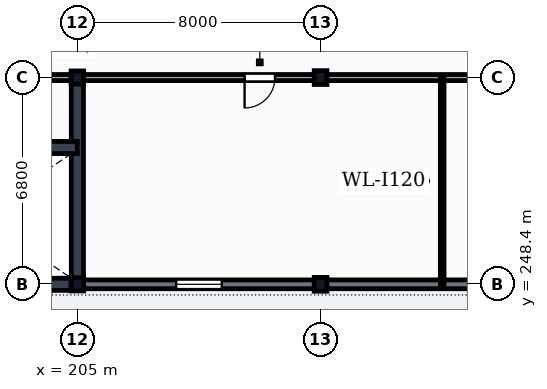
"""IFC4 building model, lengths in metres.
Left out: names, types, materials, properties, quantities, classifications, styles, units other than length and angle.
Written with IfcOpenShell. Run it as: python <this file> out.ifc"""

import sys

from ifc_helpers import new_model, si_unit, direction, frame, frame_2d, origin, origin_2d, place, context, subcontext, project, spatial, rectangle, i_section, extrude, element, fill, save


model = new_model("IFC4")
c1 = context("Model", 3, precision=1e-05, world=origin(), true_north=direction((0.0, 1.0)))
c2 = subcontext(c1, "Body", "Model", "MODEL_VIEW")
j1 = project(units=[si_unit("LENGTHUNIT", "METRE"), si_unit("PLANEANGLEUNIT", "RADIAN")], contexts=[c1])
p1 = place(None, origin())
s1 = spatial("IfcSite", under=j1, at=p1, CompositionType="ELEMENT")
p2 = place(p1, origin())
s2 = spatial("IfcBuilding", under=s1, at=p2, CompositionType="ELEMENT")
p3 = place(p2, frame((0.0, 0.0, 5.4)))
s3 = spatial("IfcBuildingStorey", under=s2, at=p3, CompositionType="ELEMENT", Elevation=5.4)
for number, where, z_axis, x_axis in (
    (1, (205.0, 248.4, 0.0), (0.0, 0.0, 1.0), (1.0, 0.0, 0.0)),
    (2, (205.0, 255.2, 0.0), (0.0, 0.0, 1.0), (1.0, 0.0, 0.0)),
):
    element("IfcColumn", number, at=place(p3, frame(where, z_axis=z_axis, x_axis=x_axis)), inside=s3, PredefinedType="COLUMN", context=c2, shape_type="SweptSolid", body=[
        extrude(i_section(OverallWidth=0.412, OverallDepth=0.435, WebThickness=0.036, FlangeThickness=0.057, FilletRadius=0.015, at=origin_2d()), origin(), (0.0, 0.0, 1.0), 5.1),
    ])
for number, where, z_axis, x_axis in (
    (3, (213.0, 248.4, 0.0), (0.0, 0.0, 1.0), (1.0, 0.0, 0.0)),
    (4, (213.0, 255.2, 0.0), (0.0, 0.0, 1.0), (1.0, 0.0, 0.0)),
):
    element("IfcColumn", number, at=place(p3, frame(where, z_axis=z_axis, x_axis=x_axis)), inside=s3, PredefinedType="COLUMN", context=c2, shape_type="SweptSolid", body=[
        extrude(i_section(OverallWidth=0.418, OverallDepth=0.455, WebThickness=0.042, FlangeThickness=0.068, FilletRadius=0.015, at=origin_2d()), origin(), (0.0, 0.0, 1.0), 5.1),
    ])
p4 = place(p3, frame((205.006, 248.4, 0.0), z_axis=(0.0, 0.0, 1.0), x_axis=(1.0, 0.0, 0.0)))
e5 = element("IfcWall", 5, at=p4, inside=s3, PredefinedType="SOLIDWALL", context=c2, shape_type="SweptSolid", body=[
    extrude(rectangle(XDim=7.988, YDim=0.29, at=frame_2d((3.994, 0.0))), origin(), (0.0, 0.0, 1.0), 4.548),
])
p5 = place(p4, frame((3.244, 0.0, 0.95)))
e6 = element("IfcOpeningElement", 6, at=p5, cuts=e5, PredefinedType="OPENING", context=c2, shape_type="SweptSolid", body=[
    extrude(rectangle(XDim=1.5, YDim=1.9, at=frame_2d((0.75, 0.95))), frame((0.0, 0.16, 0.0), z_axis=(0.0, -1.0, 0.0), x_axis=(1.0, 0.0, 0.0)), (0.0, 0.0, 1.0), 0.32),
])
p6 = place(p3, frame((213.006, 248.4, 0.0), z_axis=(0.0, 0.0, 1.0), x_axis=(1.0, 0.0, 0.0)))
e7 = element("IfcWall", 7, at=p6, inside=s3, PredefinedType="SOLIDWALL", context=c2, shape_type="SweptSolid", body=[
    extrude(rectangle(XDim=7.988, YDim=0.29, at=frame_2d((3.994, 0.0))), origin(), (0.0, 0.0, 1.0), 4.548),
])
p7 = place(p6, frame((5.091, 0.0, 0.95)))
e8 = element("IfcOpeningElement", 8, at=p7, cuts=e7, PredefinedType="OPENING", context=c2, shape_type="SweptSolid", body=[
    extrude(rectangle(XDim=1.35, YDim=1.8, at=frame_2d((0.675, 0.9))), frame((0.0, 0.16, 0.0), z_axis=(0.0, -1.0, 0.0), x_axis=(1.0, 0.0, 0.0)), (0.0, 0.0, 1.0), 0.32),
])
p8 = place(p3, frame((197.0, 248.4, 0.0), z_axis=(0.0, 0.0, 1.0), x_axis=(1.0, 0.0, 0.0)))
e9 = element("IfcWall", 9, at=p8, inside=s3, PredefinedType="SHEAR", context=c2, shape_type="SweptSolid", body=[
    extrude(rectangle(XDim=8.0, YDim=0.4, at=frame_2d((4.0, 0.0))), origin(), (0.0, 0.0, 1.0), 4.86),
])
p9 = place(p3, frame((205.0, 248.4, 0.0), z_axis=(0.0, 0.0, 1.0), x_axis=(0.0, 1.0, 0.0)))
e10 = element("IfcWall", 10, at=p9, inside=s3, PredefinedType="SHEAR", context=c2, shape_type="SweptSolid", body=[
    extrude(rectangle(XDim=6.8, YDim=0.4, at=frame_2d((3.4, 0.0))), origin(), (0.0, 0.0, 1.0), 4.86),
])
p10 = place(p3, frame((197.0, 252.9, 0.0), z_axis=(0.0, 0.0, 1.0), x_axis=(1.0, 0.0, 0.0)))
e11 = element("IfcWall", 11, at=p10, inside=s3, PredefinedType="SHEAR", context=c2, shape_type="SweptSolid", body=[
    extrude(rectangle(XDim=8.0, YDim=0.4, at=frame_2d((4.0, 0.0))), origin(), (0.0, 0.0, 1.0), 4.86),
])
p11 = place(p10, frame((0.3, 0.0, 0.0)))
e12 = element("IfcOpeningElement", 12, at=p11, cuts=e11, PredefinedType="OPENING", context=c2, shape_type="SweptSolid", body=[
    extrude(rectangle(XDim=1.15, YDim=2.15, at=frame_2d((0.575, 1.075))), frame((0.0, 0.215, 0.0), z_axis=(0.0, -1.0, 0.0), x_axis=(1.0, 0.0, 0.0)), (0.0, 0.0, 1.0), 0.43),
])
p12 = place(p3, frame((197.0, 255.2, 0.0), z_axis=(0.0, 0.0, 1.0), x_axis=(1.0, 0.0, 0.0)))
e13 = element("IfcWall", 13, at=p12, inside=s3, PredefinedType="PARTITIONING", context=c2, shape_type="SweptSolid", body=[
    extrude(rectangle(XDim=8.0, YDim=0.2, at=frame_2d((4.0, 0.0))), origin(), (0.0, 0.0, 1.0), 4.358),
])
p13 = place(p12, frame((3.275, 0.0, 0.0)))
e14 = element("IfcOpeningElement", 14, at=p13, cuts=e13, PredefinedType="OPENING", context=c2, shape_type="SweptSolid", body=[
    extrude(rectangle(XDim=1.45, YDim=2.2, at=frame_2d((0.725, 1.1))), frame((0.0, 0.115, 0.0), z_axis=(0.0, -1.0, 0.0), x_axis=(1.0, 0.0, 0.0)), (0.0, 0.0, 1.0), 0.23),
])
p14 = place(p3, frame((205.0, 255.2, 0.0), z_axis=(0.0, 0.0, 1.0), x_axis=(1.0, 0.0, 0.0)))
e15 = element("IfcWall", 15, at=p14, inside=s3, PredefinedType="PARTITIONING", context=c2, shape_type="SweptSolid", body=[
    extrude(rectangle(XDim=24.0, YDim=0.2, at=frame_2d((12.0, 0.0))), origin(), (0.0, 0.0, 1.0), 4.358),
])
p15 = place(p14, frame((5.5, 0.0, 0.0)))
e16 = element("IfcOpeningElement", 16, at=p15, cuts=e15, PredefinedType="OPENING", context=c2, shape_type="SweptSolid", body=[
    extrude(rectangle(XDim=1.0, YDim=2.1, at=frame_2d((0.5, 1.05))), frame((0.0, 0.115, 0.0), z_axis=(0.0, -1.0, 0.0), x_axis=(1.0, 0.0, 0.0)), (0.0, 0.0, 1.0), 0.23),
])
p16 = place(p14, frame((17.5, 0.0, 0.0)))
e17 = element("IfcOpeningElement", 17, at=p16, cuts=e15, PredefinedType="OPENING", context=c2, shape_type="SweptSolid", body=[
    extrude(rectangle(XDim=1.0, YDim=2.1, at=frame_2d((0.5, 1.05))), frame((0.0, 0.115, 0.0), z_axis=(0.0, -1.0, 0.0), x_axis=(1.0, 0.0, 0.0)), (0.0, 0.0, 1.0), 0.23),
])
p17 = place(p3, frame((217.0, 248.4, 0.0), z_axis=(0.0, 0.0, 1.0), x_axis=(0.0, 1.0, 0.0)))
e18 = element("IfcWall", 18, at=p17, inside=s3, PredefinedType="PARTITIONING", context=c2, shape_type="SweptSolid", body=[
    extrude(rectangle(XDim=6.8, YDim=0.12, at=frame_2d((3.4, 0.0))), origin(), (0.0, 0.0, 1.0), 4.618),
])
p18 = place(p5, origin())
e19 = element("IfcWindow", 19, at=p18, inside=s3, PartitioningType="SINGLE_PANEL", PredefinedType="WINDOW", context=c2, shape_type="SweptSolid", body=[
    extrude(rectangle(XDim=1.5, YDim=1.9, at=frame_2d((0.75, 0.95))), frame((0.0, 0.03, 0.0), z_axis=(0.0, -1.0, 0.0), x_axis=(1.0, 0.0, 0.0)), (0.0, 0.0, 1.0), 0.06),
])
fill(e6, e19)
p19 = place(p15, frame((1.0, 0.0, 0.0), z_axis=(0.0, 0.0, 1.0), x_axis=(-1.0, 0.0, 0.0)))
e20 = element("IfcDoor", 20, at=p19, inside=s3, OperationType="SINGLE_SWING_RIGHT", PredefinedType="DOOR", context=c2, shape_type="SweptSolid", body=[
    extrude(rectangle(XDim=1.0, YDim=2.1, at=frame_2d((0.5, 1.05))), frame((0.0, 0.025, 0.0), z_axis=(0.0, -1.0, 0.0), x_axis=(1.0, 0.0, 0.0)), (0.0, 0.0, 1.0), 0.05),
])
fill(e16, e20)
save(model, sys.argv[1])
